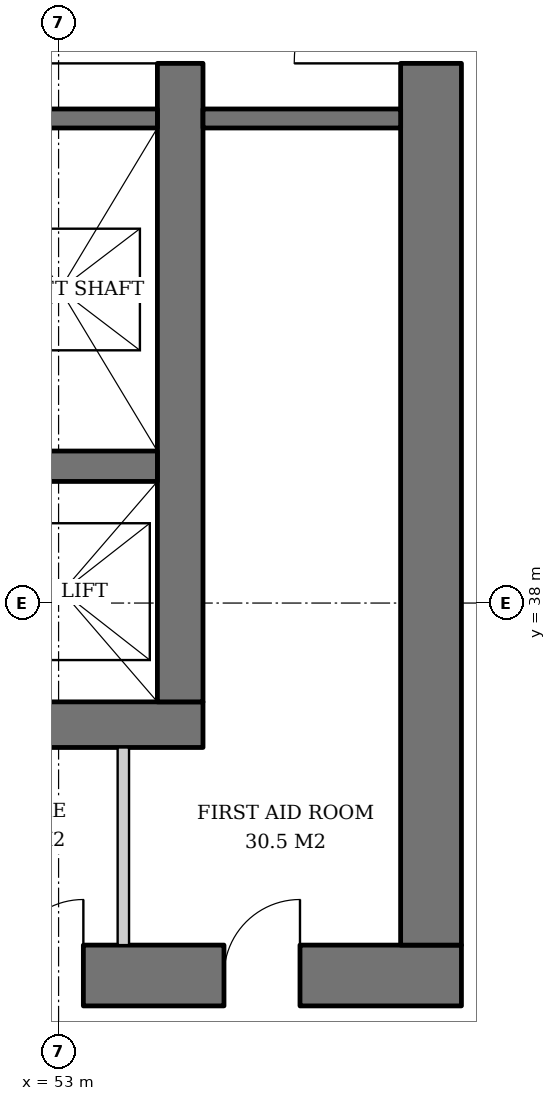
"""IFC4 building model, lengths in metres.
Left out: names, types, materials, properties, quantities, classifications, styles, units other than length and angle.
Written with IfcOpenShell. Run it as: python <this file> out.ifc"""

import sys

from ifc_helpers import new_model, si_unit, direction, frame, frame_2d, origin, place, context, subcontext, project, spatial, rectangle, extrude, element, fill, save


model = new_model("IFC4")
c1 = context("Model", 3, precision=1e-05, world=origin(), true_north=direction((0.0, 1.0)))
c2 = subcontext(c1, "Body", "Model", "MODEL_VIEW")
j1 = project(units=[si_unit("LENGTHUNIT", "METRE"), si_unit("PLANEANGLEUNIT", "RADIAN")], contexts=[c1])
p1 = place(None, origin())
s1 = spatial("IfcSite", under=j1, at=p1, CompositionType="ELEMENT")
p2 = place(p1, origin())
s2 = spatial("IfcBuilding", under=s1, at=p2, CompositionType="ELEMENT")
p3 = place(p2, frame((0.0, 0.0, 70.4)))
s3 = spatial("IfcBuildingStorey", under=s2, at=p3, CompositionType="ELEMENT", Elevation=70.4)
p4 = place(p3, frame((35.1, 36.4, 0.0), z_axis=(0.0, 0.0, 1.0), x_axis=(1.0, 0.0, 0.0)))
e1 = element("IfcWall", 1, at=p4, inside=s3, PredefinedType="SHEAR", context=c2, shape_type="SweptSolid", body=[
    extrude(rectangle(XDim=19.8, YDim=0.6, at=frame_2d((9.9, 0.0))), origin(), (0.0, 0.0, 1.0), 3.8),
])
p5 = place(p4, frame((3.9, 0.0, 0.0)))
e2 = element("IfcOpeningElement", 2, at=p5, cuts=e1, PredefinedType="OPENING", context=c2, shape_type="SweptSolid", body=[
    extrude(rectangle(XDim=1.0, YDim=2.1, at=frame_2d((0.5, 1.05))), frame((0.0, 0.31, 0.0), z_axis=(0.0, -1.0, 0.0), x_axis=(1.0, 0.0, 0.0)), (0.0, 0.0, 1.0), 0.62),
])
p6 = place(p4, frame((15.35, 0.0, 0.0)))
e3 = element("IfcOpeningElement", 3, at=p6, cuts=e1, PredefinedType="OPENING", context=c2, shape_type="SweptSolid", body=[
    extrude(rectangle(XDim=1.0, YDim=2.1, at=frame_2d((0.5, 1.05))), frame((0.0, 0.31, 0.0), z_axis=(0.0, -1.0, 0.0), x_axis=(1.0, 0.0, 0.0)), (0.0, 0.0, 1.0), 0.62),
])
p7 = place(p3, frame((54.6, 36.7, 0.0), z_axis=(0.0, 0.0, 1.0), x_axis=(0.0, 1.0, 0.0)))
e4 = element("IfcWall", 4, at=p7, inside=s3, PredefinedType="SHEAR", context=c2, shape_type="SweptSolid", body=[
    extrude(rectangle(XDim=18.6, YDim=0.6, at=frame_2d((9.3, 0.0))), origin(), (0.0, 0.0, 1.0), 3.8),
])
p8 = place(p7, frame((8.4, 0.0, 0.0)))
e5 = element("IfcOpeningElement", 5, at=p8, cuts=e4, PredefinedType="OPENING", context=c2, shape_type="SweptSolid", body=[
    extrude(rectangle(XDim=1.8, YDim=2.4, at=frame_2d((0.9, 1.2))), frame((0.0, 0.31, 0.0), z_axis=(0.0, -1.0, 0.0), x_axis=(1.0, 0.0, 0.0)), (0.0, 0.0, 1.0), 0.62),
])
p9 = place(p3, frame((31.7, 33.1, 0.0), z_axis=(0.0, 0.0, 1.0), x_axis=(1.0, 0.0, 0.0)))
e6 = element("IfcWall", 6, at=p9, inside=s3, PredefinedType="SHEAR", context=c2, shape_type="SweptSolid", body=[
    extrude(rectangle(XDim=26.6, YDim=0.8, at=frame_2d((13.3, 0.0))), origin(), (0.0, 0.0, 1.0), 3.8),
])
p10 = place(p9, frame((7.3, 0.0, 0.0)))
e7 = element("IfcOpeningElement", 7, at=p10, cuts=e6, PredefinedType="OPENING", context=c2, shape_type="SweptSolid", body=[
    extrude(rectangle(XDim=1.0, YDim=2.1, at=frame_2d((0.5, 1.05))), frame((0.0, 0.41, 0.0), z_axis=(0.0, -1.0, 0.0), x_axis=(1.0, 0.0, 0.0)), (0.0, 0.0, 1.0), 0.82),
])
p11 = place(p9, frame((18.75, 0.0, 0.0)))
e8 = element("IfcOpeningElement", 8, at=p11, cuts=e6, PredefinedType="OPENING", context=c2, shape_type="SweptSolid", body=[
    extrude(rectangle(XDim=1.0, YDim=2.1, at=frame_2d((0.5, 1.05))), frame((0.0, 0.41, 0.0), z_axis=(0.0, -1.0, 0.0), x_axis=(1.0, 0.0, 0.0)), (0.0, 0.0, 1.0), 0.82),
])
p12 = place(p9, frame((1.9, 0.0, 0.0)))
e9 = element("IfcOpeningElement", 9, at=p12, cuts=e6, PredefinedType="OPENING", context=c2, shape_type="SweptSolid", body=[
    extrude(rectangle(XDim=1.0, YDim=2.1, at=frame_2d((0.5, 1.05))), frame((0.0, 0.41, 0.0), z_axis=(0.0, -1.0, 0.0), x_axis=(1.0, 0.0, 0.0)), (0.0, 0.0, 1.0), 0.82),
])
p13 = place(p9, frame((4.725, 0.0, 0.0)))
e10 = element("IfcOpeningElement", 10, at=p13, cuts=e6, PredefinedType="OPENING", context=c2, shape_type="SweptSolid", body=[
    extrude(rectangle(XDim=1.0, YDim=2.1, at=frame_2d((0.5, 1.05))), frame((0.0, 0.41, 0.0), z_axis=(0.0, -1.0, 0.0), x_axis=(1.0, 0.0, 0.0)), (0.0, 0.0, 1.0), 0.82),
])
p14 = place(p9, frame((12.44, 0.0, 0.0)))
e11 = element("IfcOpeningElement", 11, at=p14, cuts=e6, PredefinedType="OPENING", context=c2, shape_type="SweptSolid", body=[
    extrude(rectangle(XDim=1.0, YDim=2.1, at=frame_2d((0.5, 1.05))), frame((0.0, 0.41, 0.0), z_axis=(0.0, -1.0, 0.0), x_axis=(1.0, 0.0, 0.0)), (0.0, 0.0, 1.0), 0.82),
])
p15 = place(p9, frame((20.626, 0.0, 0.0)))
e12 = element("IfcOpeningElement", 12, at=p15, cuts=e6, PredefinedType="OPENING", context=c2, shape_type="SweptSolid", body=[
    extrude(rectangle(XDim=1.0, YDim=2.1, at=frame_2d((0.5, 1.05))), frame((0.0, 0.41, 0.0), z_axis=(0.0, -1.0, 0.0), x_axis=(1.0, 0.0, 0.0)), (0.0, 0.0, 1.0), 0.82),
])
p16 = place(p9, frame((23.476, 0.0, 0.0)))
e13 = element("IfcOpeningElement", 13, at=p16, cuts=e6, PredefinedType="OPENING", context=c2, shape_type="SweptSolid", body=[
    extrude(rectangle(XDim=1.0, YDim=2.1, at=frame_2d((0.5, 1.05))), frame((0.0, 0.41, 0.0), z_axis=(0.0, -1.0, 0.0), x_axis=(1.0, 0.0, 0.0)), (0.0, 0.0, 1.0), 0.82),
])
p17 = place(p3, frame((57.9, 33.5, 0.0), z_axis=(0.0, 0.0, 1.0), x_axis=(0.0, 1.0, 0.0)))
e14 = element("IfcWall", 14, at=p17, inside=s3, PredefinedType="SHEAR", context=c2, shape_type="SweptSolid", body=[
    extrude(rectangle(XDim=25.0, YDim=0.8, at=frame_2d((12.5, 0.0))), origin(), (0.0, 0.0, 1.0), 3.8),
])
p18 = place(p17, frame((11.6, 0.0, 0.0)))
e15 = element("IfcOpeningElement", 15, at=p18, cuts=e14, PredefinedType="OPENING", context=c2, shape_type="SweptSolid", body=[
    extrude(rectangle(XDim=1.8, YDim=2.4, at=frame_2d((0.9, 1.2))), frame((0.0, 0.41, 0.0), z_axis=(0.0, -1.0, 0.0), x_axis=(1.0, 0.0, 0.0)), (0.0, 0.0, 1.0), 0.82),
])
p19 = place(p3, frame((35.7, 39.8, 0.0), z_axis=(0.0, 0.0, 1.0), x_axis=(1.0, 0.0, 0.0)))
e16 = element("IfcWall", 16, at=p19, inside=s3, PredefinedType="SHEAR", context=c2, shape_type="SweptSolid", body=[
    extrude(rectangle(XDim=18.6, YDim=0.4, at=frame_2d((9.3, 0.0))), origin(), (0.0, 0.0, 1.0), 3.8),
])
p20 = place(p3, frame((48.93, 44.375, 0.0), z_axis=(0.0, 0.0, 1.0), x_axis=(1.0, 0.0, 0.0)))
e17 = element("IfcWall", 17, at=p20, inside=s3, PredefinedType="SHEAR", context=c2, shape_type="SweptSolid", body=[
    extrude(rectangle(XDim=5.37, YDim=0.25, at=frame_2d((2.685, 0.0))), origin(), (0.0, 0.0, 1.0), 3.8),
])
p21 = place(p3, frame((54.9, 44.375, 0.0), z_axis=(0.0, 0.0, 1.0), x_axis=(1.0, 0.0, 0.0)))
e18 = element("IfcWall", 18, at=p21, inside=s3, PredefinedType="SOLIDWALL", context=c2, shape_type="SweptSolid", body=[
    extrude(rectangle(XDim=2.6, YDim=0.25, at=frame_2d((1.3, 0.0))), origin(), (0.0, 0.0, 1.0), 3.62),
])
p22 = place(p3, frame((53.852, 33.5, 0.0), z_axis=(0.0, 0.0, 1.0), x_axis=(0.0, 1.0, 0.0)))
e19 = element("IfcWall", 19, at=p22, inside=s3, PredefinedType="SOLIDWALL", context=c2, shape_type="SweptSolid", body=[
    extrude(rectangle(XDim=2.6, YDim=0.15, at=frame_2d((1.3, 0.0))), origin(), (0.0, 0.0, 1.0), 3.62),
])
p23 = place(p8, origin())
e20 = element("IfcDoor", 20, at=p23, inside=s3, OperationType="DOUBLE_DOOR_SINGLE_SWING", PredefinedType="DOOR", context=c2, shape_type="SweptSolid", body=[
    extrude(rectangle(XDim=1.8, YDim=2.4, at=frame_2d((0.9, 1.2))), frame((0.0, 0.025, 0.0), z_axis=(0.0, -1.0, 0.0), x_axis=(1.0, 0.0, 0.0)), (0.0, 0.0, 1.0), 0.05),
])
fill(e5, e20)
p24 = place(p18, origin())
e21 = element("IfcDoor", 21, at=p24, inside=s3, OperationType="DOUBLE_DOOR_SINGLE_SWING", PredefinedType="DOOR", context=c2, shape_type="SweptSolid", body=[
    extrude(rectangle(XDim=1.8, YDim=2.4, at=frame_2d((0.9, 1.2))), frame((0.0, 0.025, 0.0), z_axis=(0.0, -1.0, 0.0), x_axis=(1.0, 0.0, 0.0)), (0.0, 0.0, 1.0), 0.05),
])
fill(e15, e21)
p25 = place(p15, origin())
e22 = element("IfcDoor", 22, at=p25, inside=s3, OperationType="SINGLE_SWING_RIGHT", PredefinedType="DOOR", context=c2, shape_type="SweptSolid", body=[
    extrude(rectangle(XDim=1.0, YDim=2.1, at=frame_2d((0.5, 1.05))), frame((0.0, 0.39, 0.0), z_axis=(0.0, -1.0, 0.0), x_axis=(1.0, 0.0, 0.0)), (0.0, 0.0, 1.0), 0.05),
])
fill(e12, e22)
p26 = place(p16, origin())
e23 = element("IfcDoor", 23, at=p26, inside=s3, OperationType="SINGLE_SWING_RIGHT", PredefinedType="DOOR", context=c2, shape_type="SweptSolid", body=[
    extrude(rectangle(XDim=1.0, YDim=2.1, at=frame_2d((0.5, 1.05))), frame((0.0, 0.39, 0.0), z_axis=(0.0, -1.0, 0.0), x_axis=(1.0, 0.0, 0.0)), (0.0, 0.0, 1.0), 0.05),
])
fill(e13, e23)
save(model, sys.argv[1])
